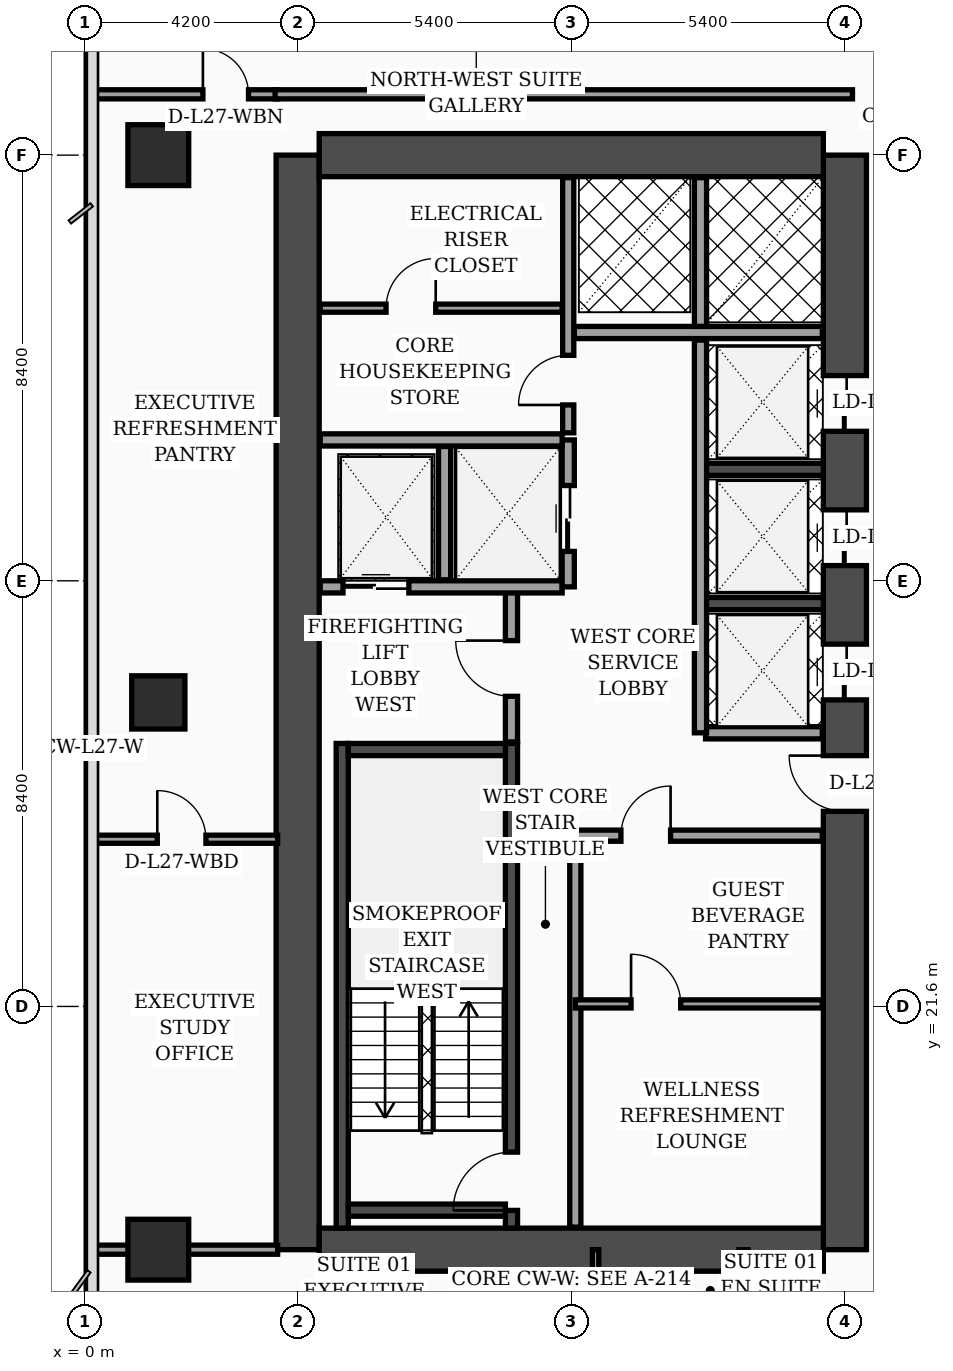
"""IFC4 building model, lengths in metres.
Left out: names, types, materials, properties, quantities, classifications, styles, units other than length and angle.
Written with IfcOpenShell. Run it as: python <this file> out.ifc"""

import sys

from ifc_helpers import new_model, si_unit, direction, frame, frame_2d, origin, origin_2d, place, context, subcontext, project, spatial, rectangle, extrude, element, fill, save


model = new_model("IFC4")
c1 = context("Model", 3, precision=1e-05, world=origin(), true_north=direction((0.0, 1.0)))
c2 = subcontext(c1, "Body", "Model", "MODEL_VIEW")
j1 = project(units=[si_unit("LENGTHUNIT", "METRE"), si_unit("PLANEANGLEUNIT", "RADIAN")], contexts=[c1])
p1 = place(None, origin())
s1 = spatial("IfcSite", under=j1, at=p1, CompositionType="ELEMENT")
p2 = place(p1, origin())
s2 = spatial("IfcBuilding", under=s1, at=p2, CompositionType="ELEMENT")
p3 = place(p2, frame((0.0, 0.0, 112.6)))
s3 = spatial("IfcBuildingStorey", under=s2, at=p3, CompositionType="ELEMENT", Elevation=112.6)
p4 = place(p3, frame((4.2, 16.8, 0.0), z_axis=(0.0, 0.0, 1.0), x_axis=(0.0, 1.0, 0.0)))
e1 = element("IfcWall", 1, at=p4, inside=s3, PredefinedType="SHEAR", context=c2, shape_type="SweptSolid", body=[
    extrude(rectangle(XDim=21.6, YDim=0.85, at=frame_2d((10.8, 0.0))), origin(), (0.0, 0.0, 1.0), 3.56),
])
p5 = place(p3, frame((15.0, 16.8, 0.0), z_axis=(0.0, 0.0, 1.0), x_axis=(0.0, 1.0, 0.0)))
e2 = element("IfcWall", 2, at=p5, inside=s3, PredefinedType="SHEAR", context=c2, shape_type="SweptSolid", body=[
    extrude(rectangle(XDim=21.6, YDim=0.85, at=frame_2d((10.8, 0.0))), origin(), (0.0, 0.0, 1.0), 3.56),
])
p6 = place(p5, frame((8.65, 0.0, 0.0)))
e3 = element("IfcOpeningElement", 3, at=p6, cuts=e2, PredefinedType="OPENING", context=c2, shape_type="SweptSolid", body=[
    extrude(rectangle(XDim=1.1, YDim=2.2, at=frame_2d((0.55, 1.1))), frame((0.0, 0.435, 0.0), z_axis=(0.0, -1.0, 0.0), x_axis=(1.0, 0.0, 0.0)), (0.0, 0.0, 1.0), 0.87),
])
p7 = place(p5, frame((10.85, 0.0, 0.0)))
e4 = element("IfcOpeningElement", 4, at=p7, cuts=e2, PredefinedType="OPENING", context=c2, shape_type="SweptSolid", body=[
    extrude(rectangle(XDim=1.1, YDim=2.2, at=frame_2d((0.55, 1.1))), frame((0.0, 0.435, 0.0), z_axis=(0.0, -1.0, 0.0), x_axis=(1.0, 0.0, 0.0)), (0.0, 0.0, 1.0), 0.87),
])
p8 = place(p5, frame((13.5, 0.0, 0.0)))
e5 = element("IfcOpeningElement", 5, at=p8, cuts=e2, PredefinedType="OPENING", context=c2, shape_type="SweptSolid", body=[
    extrude(rectangle(XDim=1.1, YDim=2.2, at=frame_2d((0.55, 1.1))), frame((0.0, 0.435, 0.0), z_axis=(0.0, -1.0, 0.0), x_axis=(1.0, 0.0, 0.0)), (0.0, 0.0, 1.0), 0.87),
])
p9 = place(p5, frame((16.15, 0.0, 0.0)))
e6 = element("IfcOpeningElement", 6, at=p9, cuts=e2, PredefinedType="OPENING", context=c2, shape_type="SweptSolid", body=[
    extrude(rectangle(XDim=1.1, YDim=2.2, at=frame_2d((0.55, 1.1))), frame((0.0, 0.435, 0.0), z_axis=(0.0, -1.0, 0.0), x_axis=(1.0, 0.0, 0.0)), (0.0, 0.0, 1.0), 0.87),
])
for number, where, z_axis, x_axis in (
    (7, (4.625, 38.4, 0.0), (0.0, 0.0, 1.0), (1.0, 0.0, 0.0)),
    (8, (4.625, 16.8, 0.0), (0.0, 0.0, 1.0), (1.0, 0.0, 0.0)),
):
    element("IfcWall", number, at=place(p3, frame(where, z_axis=z_axis, x_axis=x_axis)), inside=s3, PredefinedType="SHEAR", context=c2, shape_type="SweptSolid", body=[
        extrude(rectangle(XDim=9.95, YDim=0.85, at=frame_2d((4.975, 0.0))), origin(), (0.0, 0.0, 1.0), 3.56),
    ])
p10 = place(p3, frame((5.08, 17.225, 0.0), z_axis=(0.0, 0.0, 1.0), x_axis=(0.0, 1.0, 0.0)))
e9 = element("IfcWall", 9, at=p10, inside=s3, PredefinedType="SOLIDWALL", context=c2, shape_type="SweptSolid", body=[
    extrude(rectangle(XDim=9.565, YDim=0.24, at=frame_2d((4.782, 0.0))), origin(), (0.0, 0.0, 1.0), 3.56),
])
p11 = place(p3, frame((8.42, 17.225, 0.0), z_axis=(0.0, 0.0, 1.0), x_axis=(0.0, 1.0, 0.0)))
e10 = element("IfcWall", 10, at=p11, inside=s3, PredefinedType="SOLIDWALL", context=c2, shape_type="SweptSolid", body=[
    extrude(rectangle(XDim=9.565, YDim=0.24, at=frame_2d((4.782, 0.0))), origin(), (0.0, 0.0, 1.0), 3.56),
])
p12 = place(p11, frame((0.35, 0.0, 0.0)))
e11 = element("IfcOpeningElement", 11, at=p12, cuts=e10, PredefinedType="OPENING", context=c2, shape_type="SweptSolid", body=[
    extrude(rectangle(XDim=1.15, YDim=2.2, at=frame_2d((0.575, 1.1))), frame((0.0, 0.13, 0.0), z_axis=(0.0, -1.0, 0.0), x_axis=(1.0, 0.0, 0.0)), (0.0, 0.0, 1.0), 0.26),
])
for number, where, z_axis, x_axis in (
    (12, (5.2, 17.58, 0.0), (0.0, 0.0, 1.0), (1.0, 0.0, 0.0)),
    (13, (5.2, 26.67, 0.0), (0.0, 0.0, 1.0), (1.0, 0.0, 0.0)),
):
    element("IfcWall", number, at=place(p3, frame(where, z_axis=z_axis, x_axis=x_axis)), inside=s3, PredefinedType="SOLIDWALL", context=c2, shape_type="SweptSolid", body=[
        extrude(rectangle(XDim=3.1, YDim=0.24, at=frame_2d((1.55, 0.0))), origin(), (0.0, 0.0, 1.0), 3.56),
    ])
for number, where, z_axis, x_axis in (
    (14, (12.18, 29.55, 0.0), (0.0, 0.0, 1.0), (1.0, 0.0, 0.0)),
    (15, (12.18, 32.2, 0.0), (0.0, 0.0, 1.0), (1.0, 0.0, 0.0)),
):
    element("IfcWall", number, at=place(p3, frame(where, z_axis=z_axis, x_axis=x_axis)), inside=s3, PredefinedType="SOLIDWALL", context=c2, shape_type="SweptSolid", body=[
        extrude(rectangle(XDim=2.395, YDim=0.24, at=frame_2d((1.198, 0.0))), origin(), (0.0, 0.0, 1.0), 3.56),
    ])
p13 = place(p3, frame((1.45, 16.8, 0.0), z_axis=(0.0, 0.0, 1.0), x_axis=(1.0, 0.0, 0.0)))
e16 = element("IfcColumn", 16, at=p13, inside=s3, PredefinedType="COLUMN", context=c2, shape_type="SweptSolid", body=[
    extrude(rectangle(XDim=1.2, YDim=1.2, at=origin_2d()), origin(), (0.0, 0.0, 1.0), 3.56),
])
p14 = place(p3, frame((1.45, 27.6, 0.0), z_axis=(0.0, 0.0, 1.0), x_axis=(1.0, 0.0, 0.0)))
e17 = element("IfcColumn", 17, at=p14, inside=s3, PredefinedType="COLUMN", context=c2, shape_type="SweptSolid", body=[
    extrude(rectangle(XDim=1.05, YDim=1.05, at=origin_2d()), origin(), (0.0, 0.0, 1.0), 3.56),
])
p15 = place(p3, frame((1.45, 38.4, 0.0), z_axis=(0.0, 0.0, 1.0), x_axis=(1.0, 0.0, 0.0)))
e18 = element("IfcColumn", 18, at=p15, inside=s3, PredefinedType="COLUMN", context=c2, shape_type="SweptSolid", body=[
    extrude(rectangle(XDim=1.2, YDim=1.2, at=origin_2d()), origin(), (0.0, 0.0, 1.0), 3.56),
])
p16 = place(p3, frame((8.42, 26.82, 0.0), z_axis=(0.0, 0.0, 1.0), x_axis=(0.0, 1.0, 0.0)))
e19 = element("IfcWall", 19, at=p16, inside=s3, PredefinedType="SOLIDWALL", context=c2, shape_type="SweptSolid", body=[
    extrude(rectangle(XDim=3.0, YDim=0.24, at=frame_2d((1.5, 0.0))), origin(), (0.0, 0.0, 1.0), 3.56),
])
p17 = place(p16, frame((0.9, 0.0, 0.0)))
e20 = element("IfcOpeningElement", 20, at=p17, cuts=e19, PredefinedType="OPENING", context=c2, shape_type="SweptSolid", body=[
    extrude(rectangle(XDim=1.1, YDim=2.2, at=frame_2d((0.55, 1.1))), frame((0.0, 0.13, 0.0), z_axis=(0.0, -1.0, 0.0), x_axis=(1.0, 0.0, 0.0)), (0.0, 0.0, 1.0), 0.26),
])
p18 = place(p3, frame((4.645, 29.88, 0.0), z_axis=(0.0, 0.0, 1.0), x_axis=(1.0, 0.0, 0.0)))
e21 = element("IfcWall", 21, at=p18, inside=s3, PredefinedType="SOLIDWALL", context=c2, shape_type="SweptSolid", body=[
    extrude(rectangle(XDim=4.775, YDim=0.24, at=frame_2d((2.387, 0.0))), origin(), (0.0, 0.0, 1.0), 3.56),
])
p19 = place(p18, frame((0.45, 0.0, 0.0)))
e22 = element("IfcOpeningElement", 22, at=p19, cuts=e21, PredefinedType="OPENING", context=c2, shape_type="SweptSolid", body=[
    extrude(rectangle(XDim=1.3, YDim=2.35, at=frame_2d((0.65, 1.175))), frame((0.0, 0.13, 0.0), z_axis=(0.0, -1.0, 0.0), x_axis=(1.0, 0.0, 0.0)), (0.0, 0.0, 1.0), 0.26),
])
p20 = place(p3, frame((7.1, 30.02, 0.0), z_axis=(0.0, 0.0, 1.0), x_axis=(0.0, 1.0, 0.0)))
e23 = element("IfcWall", 23, at=p20, inside=s3, PredefinedType="SOLIDWALL", context=c2, shape_type="SweptSolid", body=[
    extrude(rectangle(XDim=2.63, YDim=0.24, at=frame_2d((1.315, 0.0))), origin(), (0.0, 0.0, 1.0), 3.56),
])
p21 = place(p3, frame((9.54, 29.88, 0.0), z_axis=(0.0, 0.0, 1.0), x_axis=(0.0, 1.0, 0.0)))
e24 = element("IfcWall", 24, at=p21, inside=s3, PredefinedType="SOLIDWALL", context=c2, shape_type="SweptSolid", body=[
    extrude(rectangle(XDim=2.9, YDim=0.24, at=frame_2d((1.45, 0.0))), origin(), (0.0, 0.0, 1.0), 3.56),
])
p22 = place(p21, frame((0.7, 0.0, 0.0)))
e25 = element("IfcOpeningElement", 25, at=p22, cuts=e24, PredefinedType="OPENING", context=c2, shape_type="SweptSolid", body=[
    extrude(rectangle(XDim=1.3, YDim=2.35, at=frame_2d((0.65, 1.175))), frame((0.0, 0.13, 0.0), z_axis=(0.0, -1.0, 0.0), x_axis=(1.0, 0.0, 0.0)), (0.0, 0.0, 1.0), 0.26),
])
p23 = place(p3, frame((4.645, 32.78, 0.0), z_axis=(0.0, 0.0, 1.0), x_axis=(1.0, 0.0, 0.0)))
e26 = element("IfcWall", 26, at=p23, inside=s3, PredefinedType="SOLIDWALL", context=c2, shape_type="SweptSolid", body=[
    extrude(rectangle(XDim=4.775, YDim=0.24, at=frame_2d((2.387, 0.0))), origin(), (0.0, 0.0, 1.0), 3.19),
])
p24 = place(p3, frame((9.68, 17.245, 0.0), z_axis=(0.0, 0.0, 1.0), x_axis=(0.0, 1.0, 0.0)))
e27 = element("IfcWall", 27, at=p24, inside=s3, PredefinedType="SOLIDWALL", context=c2, shape_type="SweptSolid", body=[
    extrude(rectangle(XDim=7.755, YDim=0.22, at=frame_2d((3.877, 0.0))), origin(), (0.0, 0.0, 1.0), 3.56),
])
p25 = place(p3, frame((4.645, 35.38, 0.0), z_axis=(0.0, 0.0, 1.0), x_axis=(1.0, 0.0, 0.0)))
e28 = element("IfcWall", 28, at=p25, inside=s3, PredefinedType="PARTITIONING", context=c2, shape_type="SweptSolid", body=[
    extrude(rectangle(XDim=4.775, YDim=0.16, at=frame_2d((2.387, 0.0))), origin(), (0.0, 0.0, 1.0), 3.56),
])
p26 = place(p25, frame((1.3, 0.0, 0.0)))
e29 = element("IfcOpeningElement", 29, at=p26, cuts=e28, PredefinedType="OPENING", context=c2, shape_type="SweptSolid", body=[
    extrude(rectangle(XDim=0.98, YDim=2.15, at=frame_2d((0.49, 1.075))), frame((0.0, 0.09, 0.0), z_axis=(0.0, -1.0, 0.0), x_axis=(1.0, 0.0, 0.0)), (0.0, 0.0, 1.0), 0.18),
])
p27 = place(p3, frame((9.54, 32.92, 0.0), z_axis=(0.0, 0.0, 1.0), x_axis=(0.0, 1.0, 0.0)))
e30 = element("IfcWall", 30, at=p27, inside=s3, PredefinedType="SOLIDWALL", context=c2, shape_type="SweptSolid", body=[
    extrude(rectangle(XDim=5.035, YDim=0.22, at=frame_2d((2.518, 0.0))), origin(), (0.0, 0.0, 1.0), 3.56),
])
p28 = place(p27, frame((0.55, 0.0, 0.0)))
e31 = element("IfcOpeningElement", 31, at=p28, cuts=e30, PredefinedType="OPENING", context=c2, shape_type="SweptSolid", body=[
    extrude(rectangle(XDim=0.98, YDim=2.15, at=frame_2d((0.49, 1.075))), frame((0.0, 0.12, 0.0), z_axis=(0.0, -1.0, 0.0), x_axis=(1.0, 0.0, 0.0)), (0.0, 0.0, 1.0), 0.24),
])
p29 = place(p3, frame((9.68, 21.65, 0.0), z_axis=(0.0, 0.0, 1.0), x_axis=(1.0, 0.0, 0.0)))
e32 = element("IfcWall", 32, at=p29, inside=s3, PredefinedType="PARTITIONING", context=c2, shape_type="SweptSolid", body=[
    extrude(rectangle(XDim=4.875, YDim=0.16, at=frame_2d((2.438, 0.0))), origin(), (0.0, 0.0, 1.0), 3.09),
])
p30 = place(p29, frame((1.1, 0.0, 0.0)))
e33 = element("IfcOpeningElement", 33, at=p30, cuts=e32, PredefinedType="OPENING", context=c2, shape_type="SweptSolid", body=[
    extrude(rectangle(XDim=0.98, YDim=2.15, at=frame_2d((0.49, 1.075))), frame((0.0, 0.09, 0.0), z_axis=(0.0, -1.0, 0.0), x_axis=(1.0, 0.0, 0.0)), (0.0, 0.0, 1.0), 0.18),
])
p31 = place(p3, frame((9.68, 24.97, 0.0), z_axis=(0.0, 0.0, 1.0), x_axis=(1.0, 0.0, 0.0)))
e34 = element("IfcWall", 34, at=p31, inside=s3, PredefinedType="SOLIDWALL", context=c2, shape_type="SweptSolid", body=[
    extrude(rectangle(XDim=4.875, YDim=0.22, at=frame_2d((2.438, 0.0))), origin(), (0.0, 0.0, 1.0), 2.84),
])
p32 = place(p31, frame((0.9, 0.0, 0.0)))
e35 = element("IfcOpeningElement", 35, at=p32, cuts=e34, PredefinedType="OPENING", context=c2, shape_type="SweptSolid", body=[
    extrude(rectangle(XDim=0.98, YDim=2.15, at=frame_2d((0.49, 1.075))), frame((0.0, 0.12, 0.0), z_axis=(0.0, -1.0, 0.0), x_axis=(1.0, 0.0, 0.0)), (0.0, 0.0, 1.0), 0.24),
])
p33 = place(p3, frame((12.25, 27.0, 0.0), z_axis=(0.0, 0.0, 1.0), x_axis=(1.0, 0.0, 0.0)))
e36 = element("IfcWall", 36, at=p33, inside=s3, PredefinedType="SOLIDWALL", context=c2, shape_type="SweptSolid", body=[
    extrude(rectangle(XDim=2.305, YDim=0.24, at=frame_2d((1.152, 0.0))), origin(), (0.0, 0.0, 1.0), 3.56),
])
p34 = place(p3, frame((12.15, 27.0, 0.0), z_axis=(0.0, 0.0, 1.0), x_axis=(0.0, 1.0, 0.0)))
e37 = element("IfcWall", 37, at=p34, inside=s3, PredefinedType="SOLIDWALL", context=c2, shape_type="SweptSolid", body=[
    extrude(rectangle(XDim=7.75, YDim=0.24, at=frame_2d((3.875, 0.0))), origin(), (0.0, 0.0, 1.0), 3.56),
])
p35 = place(p3, frame((9.66, 34.9, 0.0), z_axis=(0.0, 0.0, 1.0), x_axis=(1.0, 0.0, 0.0)))
e38 = element("IfcWall", 38, at=p35, inside=s3, PredefinedType="SOLIDWALL", context=c2, shape_type="SweptSolid", body=[
    extrude(rectangle(XDim=4.895, YDim=0.24, at=frame_2d((2.448, 0.0))), origin(), (0.0, 0.0, 1.0), 3.56),
])
p36 = place(p3, frame((12.15, 35.02, 0.0), z_axis=(0.0, 0.0, 1.0), x_axis=(0.0, 1.0, 0.0)))
e39 = element("IfcWall", 39, at=p36, inside=s3, PredefinedType="SOLIDWALL", context=c2, shape_type="SweptSolid", body=[
    extrude(rectangle(XDim=2.935, YDim=0.24, at=frame_2d((1.468, 0.0))), origin(), (0.0, 0.0, 1.0), 3.56),
])
p37 = place(p3, frame((0.08, 24.9, 0.0), z_axis=(0.0, 0.0, 1.0), x_axis=(1.0, 0.0, 0.0)))
e40 = element("IfcWall", 40, at=p37, inside=s3, PredefinedType="PARTITIONING", context=c2, shape_type="SweptSolid", body=[
    extrude(rectangle(XDim=3.725, YDim=0.16, at=frame_2d((1.862, 0.0))), origin(), (0.0, 0.0, 1.0), 3.04),
])
p38 = place(p37, frame((1.35, 0.0, 0.0)))
e41 = element("IfcOpeningElement", 41, at=p38, cuts=e40, PredefinedType="OPENING", context=c2, shape_type="SweptSolid", body=[
    extrude(rectangle(XDim=0.96, YDim=2.2, at=frame_2d((0.48, 1.1))), frame((0.0, 0.09, 0.0), z_axis=(0.0, -1.0, 0.0), x_axis=(1.0, 0.0, 0.0)), (0.0, 0.0, 1.0), 0.18),
])
p39 = place(p3, frame((0.08, 16.8, 0.0), z_axis=(0.0, 0.0, 1.0), x_axis=(1.0, 0.0, 0.0)))
e42 = element("IfcWall", 42, at=p39, inside=s3, PredefinedType="PARTITIONING", context=c2, shape_type="SweptSolid", body=[
    extrude(rectangle(XDim=3.725, YDim=0.18, at=frame_2d((1.862, 0.0))), origin(), (0.0, 0.0, 1.0), 2.84),
])
p40 = place(p3, frame((0.08, 39.6, 0.0), z_axis=(0.0, 0.0, 1.0), x_axis=(1.0, 0.0, 0.0)))
e43 = element("IfcWall", 43, at=p40, inside=s3, PredefinedType="PARTITIONING", context=c2, shape_type="SweptSolid", body=[
    extrude(rectangle(XDim=3.725, YDim=0.18, at=frame_2d((1.862, 0.0))), origin(), (0.0, 0.0, 1.0), 2.84),
])
p41 = place(p40, frame((2.25, 0.0, 0.0)))
e44 = element("IfcOpeningElement", 44, at=p41, cuts=e43, PredefinedType="OPENING", context=c2, shape_type="SweptSolid", body=[
    extrude(rectangle(XDim=0.9, YDim=2.15, at=frame_2d((0.45, 1.075))), frame((0.0, 0.1, 0.0), z_axis=(0.0, -1.0, 0.0), x_axis=(1.0, 0.0, 0.0)), (0.0, 0.0, 1.0), 0.2),
])
p42 = place(p3, frame((10.08, 14.55, 0.0), z_axis=(0.0, 0.0, 1.0), x_axis=(0.0, 1.0, 0.0)))
e45 = element("IfcWall", 45, at=p42, inside=s3, PredefinedType="PARTITIONING", context=c2, shape_type="SweptSolid", body=[
    extrude(rectangle(XDim=2.25, YDim=0.125, at=frame_2d((1.125, 0.0))), origin(), (0.0, 0.0, 1.0), 3.56),
])
p43 = place(p3, frame((13.0, 2.44, 0.0), z_axis=(0.0, 0.0, 1.0), x_axis=(0.0, 1.0, 0.0)))
e46 = element("IfcWall", 46, at=p43, inside=s3, PredefinedType="PARTITIONING", context=c2, shape_type="SweptSolid", body=[
    extrude(rectangle(XDim=14.36, YDim=0.18, at=frame_2d((7.18, 0.0))), origin(), (0.0, 0.0, 1.0), 2.84),
])
p44 = place(p43, frame((3.01, 0.0, 0.0)))
e47 = element("IfcOpeningElement", 47, at=p44, cuts=e46, PredefinedType="OPENING", context=c2, shape_type="SweptSolid", body=[
    extrude(rectangle(XDim=1.02, YDim=2.2, at=frame_2d((0.51, 1.1))), frame((0.0, 0.1, 0.0), z_axis=(0.0, -1.0, 0.0), x_axis=(1.0, 0.0, 0.0)), (0.0, 0.0, 1.0), 0.2),
])
p45 = place(p3, frame((3.755, 39.6, 0.0), z_axis=(0.0, 0.0, 1.0), x_axis=(1.0, 0.0, 0.0)))
e48 = element("IfcWall", 48, at=p45, inside=s3, PredefinedType="PARTITIONING", context=c2, shape_type="SweptSolid", body=[
    extrude(rectangle(XDim=11.395, YDim=0.18, at=frame_2d((5.698, 0.0))), origin(), (0.0, 0.0, 1.0), 2.84),
])
p46 = place(p17, origin())
e49 = element("IfcDoor", 49, at=p46, inside=s3, OperationType="SINGLE_SWING_RIGHT", PredefinedType="DOOR", context=c2, shape_type="SweptSolid", body=[
    extrude(rectangle(XDim=1.1, YDim=2.2, at=frame_2d((0.55, 1.1))), frame((0.0, 0.025, 0.0), z_axis=(0.0, -1.0, 0.0), x_axis=(1.0, 0.0, 0.0)), (0.0, 0.0, 1.0), 0.05),
])
fill(e20, e49)
p47 = place(p19, origin())
e50 = element("IfcDoor", 50, at=p47, inside=s3, OperationType="DOUBLE_DOOR_SLIDING", PredefinedType="DOOR", context=c2, shape_type="SweptSolid", body=[
    extrude(rectangle(XDim=1.3, YDim=2.35, at=frame_2d((0.65, 1.175))), frame((0.0, 0.025, 0.0), z_axis=(0.0, -1.0, 0.0), x_axis=(1.0, 0.0, 0.0)), (0.0, 0.0, 1.0), 0.05),
])
fill(e22, e50)
p48 = place(p22, origin())
e51 = element("IfcDoor", 51, at=p48, inside=s3, OperationType="DOUBLE_DOOR_SLIDING", PredefinedType="DOOR", context=c2, shape_type="SweptSolid", body=[
    extrude(rectangle(XDim=1.3, YDim=2.35, at=frame_2d((0.65, 1.175))), frame((0.0, 0.025, 0.0), z_axis=(0.0, -1.0, 0.0), x_axis=(1.0, 0.0, 0.0)), (0.0, 0.0, 1.0), 0.05),
])
fill(e25, e51)
p49 = place(p26, origin())
e52 = element("IfcDoor", 52, at=p49, inside=s3, OperationType="SINGLE_SWING_RIGHT", PredefinedType="DOOR", context=c2, shape_type="SweptSolid", body=[
    extrude(rectangle(XDim=0.98, YDim=2.15, at=frame_2d((0.49, 1.075))), frame((0.0, 0.025, 0.0), z_axis=(0.0, -1.0, 0.0), x_axis=(1.0, 0.0, 0.0)), (0.0, 0.0, 1.0), 0.05),
])
fill(e29, e52)
p50 = place(p28, origin())
e53 = element("IfcDoor", 53, at=p50, inside=s3, OperationType="SINGLE_SWING_LEFT", PredefinedType="DOOR", context=c2, shape_type="SweptSolid", body=[
    extrude(rectangle(XDim=0.98, YDim=2.15, at=frame_2d((0.49, 1.075))), frame((0.0, 0.025, 0.0), z_axis=(0.0, -1.0, 0.0), x_axis=(1.0, 0.0, 0.0)), (0.0, 0.0, 1.0), 0.05),
])
fill(e31, e53)
p51 = place(p30, origin())
e54 = element("IfcDoor", 54, at=p51, inside=s3, OperationType="SINGLE_SWING_LEFT", PredefinedType="DOOR", context=c2, shape_type="SweptSolid", body=[
    extrude(rectangle(XDim=0.98, YDim=2.15, at=frame_2d((0.49, 1.075))), frame((0.0, 0.025, 0.0), z_axis=(0.0, -1.0, 0.0), x_axis=(1.0, 0.0, 0.0)), (0.0, 0.0, 1.0), 0.05),
])
fill(e33, e54)
p52 = place(p32, origin())
e55 = element("IfcDoor", 55, at=p52, inside=s3, OperationType="SINGLE_SWING_RIGHT", PredefinedType="DOOR", context=c2, shape_type="SweptSolid", body=[
    extrude(rectangle(XDim=0.98, YDim=2.15, at=frame_2d((0.49, 1.075))), frame((0.0, 0.025, 0.0), z_axis=(0.0, -1.0, 0.0), x_axis=(1.0, 0.0, 0.0)), (0.0, 0.0, 1.0), 0.05),
])
fill(e35, e55)
p53 = place(p38, origin())
e56 = element("IfcDoor", 56, at=p53, inside=s3, OperationType="SINGLE_SWING_LEFT", PredefinedType="DOOR", context=c2, shape_type="SweptSolid", body=[
    extrude(rectangle(XDim=0.96, YDim=2.2, at=frame_2d((0.48, 1.1))), frame((0.0, 0.025, 0.0), z_axis=(0.0, -1.0, 0.0), x_axis=(1.0, 0.0, 0.0)), (0.0, 0.0, 1.0), 0.05),
])
fill(e41, e56)
p54 = place(p41, origin())
e57 = element("IfcDoor", 57, at=p54, inside=s3, OperationType="SINGLE_SWING_LEFT", PredefinedType="DOOR", context=c2, shape_type="SweptSolid", body=[
    extrude(rectangle(XDim=0.9, YDim=2.15, at=frame_2d((0.45, 1.075))), frame((0.0, 0.025, 0.0), z_axis=(0.0, -1.0, 0.0), x_axis=(1.0, 0.0, 0.0)), (0.0, 0.0, 1.0), 0.05),
])
fill(e44, e57)
p55 = place(p12, origin())
e58 = element("IfcDoor", 58, at=p55, inside=s3, OperationType="SINGLE_SWING_LEFT", PredefinedType="DOOR", context=c2, shape_type="SweptSolid", body=[
    extrude(rectangle(XDim=1.15, YDim=2.2, at=frame_2d((0.575, 1.1))), frame((0.0, 0.025, 0.0), z_axis=(0.0, -1.0, 0.0), x_axis=(1.0, 0.0, 0.0)), (0.0, 0.0, 1.0), 0.05),
])
fill(e11, e58)
p56 = place(p6, origin())
e59 = element("IfcDoor", 59, at=p56, inside=s3, OperationType="SINGLE_SWING_RIGHT", PredefinedType="DOOR", context=c2, shape_type="SweptSolid", body=[
    extrude(rectangle(XDim=1.1, YDim=2.2, at=frame_2d((0.55, 1.1))), frame((0.0, 0.025, 0.0), z_axis=(0.0, -1.0, 0.0), x_axis=(1.0, 0.0, 0.0)), (0.0, 0.0, 1.0), 0.05),
])
fill(e3, e59)
p57 = place(p7, origin())
e60 = element("IfcDoor", 60, at=p57, inside=s3, OperationType="DOUBLE_DOOR_SLIDING", PredefinedType="DOOR", context=c2, shape_type="SweptSolid", body=[
    extrude(rectangle(XDim=1.1, YDim=2.2, at=frame_2d((0.55, 1.1))), frame((0.0, 0.025, 0.0), z_axis=(0.0, -1.0, 0.0), x_axis=(1.0, 0.0, 0.0)), (0.0, 0.0, 1.0), 0.05),
])
fill(e4, e60)
p58 = place(p8, origin())
e61 = element("IfcDoor", 61, at=p58, inside=s3, OperationType="DOUBLE_DOOR_SLIDING", PredefinedType="DOOR", context=c2, shape_type="SweptSolid", body=[
    extrude(rectangle(XDim=1.1, YDim=2.2, at=frame_2d((0.55, 1.1))), frame((0.0, 0.025, 0.0), z_axis=(0.0, -1.0, 0.0), x_axis=(1.0, 0.0, 0.0)), (0.0, 0.0, 1.0), 0.05),
])
fill(e5, e61)
p59 = place(p9, origin())
e62 = element("IfcDoor", 62, at=p59, inside=s3, OperationType="DOUBLE_DOOR_SLIDING", PredefinedType="DOOR", context=c2, shape_type="SweptSolid", body=[
    extrude(rectangle(XDim=1.1, YDim=2.2, at=frame_2d((0.55, 1.1))), frame((0.0, 0.025, 0.0), z_axis=(0.0, -1.0, 0.0), x_axis=(1.0, 0.0, 0.0)), (0.0, 0.0, 1.0), 0.05),
])
fill(e6, e62)
save(model, sys.argv[1])
